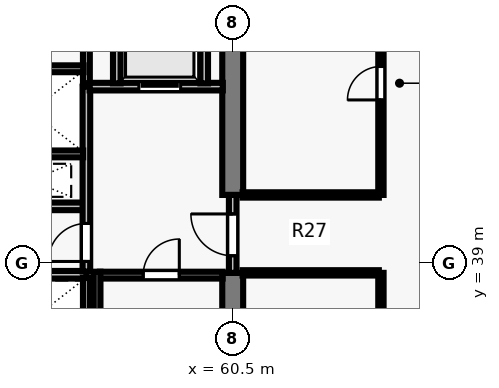
"""IFC4 building model, lengths in metres.
Left out: names, types, materials, properties, quantities, classifications, styles, units other than length and angle.
Written with IfcOpenShell. Run it as: python <this file> out.ifc"""

import sys

from ifc_helpers import new_model, si_unit, direction, frame, frame_2d, origin, place, context, subcontext, project, spatial, rectangle, extrude, element, fill, save


model = new_model("IFC4")
c1 = context("Model", 3, precision=1e-05, world=origin(), true_north=direction((0.0, 1.0)))
c2 = subcontext(c1, "Body", "Model", "MODEL_VIEW")
j1 = project(units=[si_unit("LENGTHUNIT", "METRE"), si_unit("PLANEANGLEUNIT", "RADIAN")], contexts=[c1])
p1 = place(None, origin())
s1 = spatial("IfcSite", under=j1, at=p1, CompositionType="ELEMENT")
p2 = place(p1, origin())
s2 = spatial("IfcBuilding", under=s1, at=p2, CompositionType="ELEMENT")
p3 = place(p2, frame((0.0, 0.0, 93.5)))
s3 = spatial("IfcBuildingStorey", under=s2, at=p3, CompositionType="ELEMENT", Elevation=93.5)
p4 = place(p3, frame((60.5, 30.765, 0.0), z_axis=(0.0, 0.0, 1.0), x_axis=(0.0, 1.0, 0.0)))
e1 = element("IfcWall", 1, at=p4, inside=s3, PredefinedType="SHEAR", context=c2, shape_type="SweptSolid", body=[
    extrude(rectangle(XDim=7.985, YDim=0.55, at=frame_2d((3.993, 0.0))), origin(), (0.0, 0.0, 1.0), 3.24),
])
p5 = place(p3, frame((60.5, 40.8, 0.0), z_axis=(0.0, 0.0, 1.0), x_axis=(0.0, 1.0, 0.0)))
e2 = element("IfcWall", 2, at=p5, inside=s3, PredefinedType="SHEAR", context=c2, shape_type="SweptSolid", body=[
    extrude(rectangle(XDim=6.435, YDim=0.55, at=frame_2d((3.218, 0.0))), origin(), (0.0, 0.0, 1.0), 3.24),
])
for number, where, z_axis, x_axis in (
    (3, (53.7, 38.7, 0.0), (0.0, 0.0, 1.0), (1.0, 0.0, 0.0)),
    (4, (53.7, 40.5, 0.0), (0.0, 0.0, 1.0), (1.0, 0.0, 0.0)),
):
    element("IfcWall", number, at=place(p3, frame(where, z_axis=z_axis, x_axis=x_axis)), inside=s3, PredefinedType="SOLIDWALL", context=c2, shape_type="SweptSolid", body=[
        extrude(rectangle(XDim=2.95, YDim=0.2, at=frame_2d((1.475, 0.0))), origin(), (0.0, 0.0, 1.0), 3.24),
    ])
p6 = place(p3, frame((60.5, 38.75, 0.0), z_axis=(0.0, 0.0, 1.0), x_axis=(0.0, 1.0, 0.0)))
e5 = element("IfcWall", 5, at=p6, inside=s3, PredefinedType="SOLIDWALL", context=c2, shape_type="SweptSolid", body=[
    extrude(rectangle(XDim=2.05, YDim=0.2, at=frame_2d((1.025, 0.0))), origin(), (0.0, 0.0, 1.0), 3.24),
])
p7 = place(p6, frame((0.45, 0.0, 0.0)))
e6 = element("IfcOpeningElement", 6, at=p7, cuts=e5, PredefinedType="OPENING", context=c2, shape_type="SweptSolid", body=[
    extrude(rectangle(XDim=1.1, YDim=2.15, at=frame_2d((0.55, 1.075))), frame((0.0, 0.11, 0.0), z_axis=(0.0, -1.0, 0.0), x_axis=(1.0, 0.0, 0.0)), (0.0, 0.0, 1.0), 0.22),
])
p8 = place(p3, frame((56.65, 38.785, 0.0), z_axis=(0.0, 0.0, 1.0), x_axis=(0.0, 1.0, 0.0)))
e7 = element("IfcWall", 7, at=p8, inside=s3, PredefinedType="SOLIDWALL", context=c2, shape_type="SweptSolid", body=[
    extrude(rectangle(XDim=4.865, YDim=0.2, at=frame_2d((2.433, 0.0))), origin(), (0.0, 0.0, 1.0), 3.24),
])
p9 = place(p8, frame((0.265, 0.0, 0.0)))
e8 = element("IfcOpeningElement", 8, at=p9, cuts=e7, PredefinedType="OPENING", context=c2, shape_type="SweptSolid", body=[
    extrude(rectangle(XDim=1.0, YDim=2.15, at=frame_2d((0.5, 1.075))), frame((0.0, 0.11, 0.0), z_axis=(0.0, -1.0, 0.0), x_axis=(1.0, 0.0, 0.0)), (0.0, 0.0, 1.0), 0.22),
])
p10 = place(p3, frame((56.735, 43.65, 0.0), z_axis=(0.0, 0.0, 1.0), x_axis=(1.0, 0.0, 0.0)))
e9 = element("IfcWall", 9, at=p10, inside=s3, PredefinedType="SOLIDWALL", context=c2, shape_type="SweptSolid", body=[
    extrude(rectangle(XDim=3.505, YDim=0.2, at=frame_2d((1.752, 0.0))), origin(), (0.0, 0.0, 1.0), 3.24),
])
p11 = place(p10, frame((1.295, 0.0, 0.0)))
e10 = element("IfcOpeningElement", 10, at=p11, cuts=e9, PredefinedType="OPENING", context=c2, shape_type="SweptSolid", body=[
    extrude(rectangle(XDim=1.1, YDim=2.2, at=frame_2d((0.55, 1.1))), frame((0.0, 0.11, 0.0), z_axis=(0.0, -1.0, 0.0), x_axis=(1.0, 0.0, 0.0)), (0.0, 0.0, 1.0), 0.22),
])
for number, where, z_axis, x_axis in (
    (11, (57.45, 43.735, 0.0), (0.0, 0.0, 1.0), (0.0, 1.0, 0.0)),
    (12, (59.75, 43.735, 0.0), (0.0, 0.0, 1.0), (0.0, 1.0, 0.0)),
):
    element("IfcWall", number, at=place(p3, frame(where, z_axis=z_axis, x_axis=x_axis)), inside=s3, PredefinedType="SOLIDWALL", context=c2, shape_type="SweptSolid", body=[
        extrude(rectangle(XDim=3.505, YDim=0.2, at=frame_2d((1.752, 0.0))), origin(), (0.0, 0.0, 1.0), 3.24),
    ])
p12 = place(p3, frame((56.65, 30.76, 0.0), z_axis=(0.0, 0.0, 1.0), x_axis=(0.0, 1.0, 0.0)))
e13 = element("IfcWall", 13, at=p12, inside=s3, PredefinedType="SOLIDWALL", context=c2, shape_type="SweptSolid", body=[
    extrude(rectangle(XDim=7.855, YDim=0.18, at=frame_2d((3.927, 0.0))), origin(), (0.0, 0.0, 1.0), 3.24),
])
p13 = place(p3, frame((56.65, 43.735, 0.0), z_axis=(0.0, 0.0, 1.0), x_axis=(0.0, 1.0, 0.0)))
e14 = element("IfcWall", 14, at=p13, inside=s3, PredefinedType="SOLIDWALL", context=c2, shape_type="SweptSolid", body=[
    extrude(rectangle(XDim=3.505, YDim=0.18, at=frame_2d((1.752, 0.0))), origin(), (0.0, 0.0, 1.0), 3.24),
])
p14 = place(p3, frame((53.785, 41.88, 0.0), z_axis=(0.0, 0.0, 1.0), x_axis=(1.0, 0.0, 0.0)))
e15 = element("IfcWall", 15, at=p14, inside=s3, PredefinedType="SOLIDWALL", context=c2, shape_type="SweptSolid", body=[
    extrude(rectangle(XDim=2.78, YDim=0.18, at=frame_2d((1.39, 0.0))), origin(), (0.0, 0.0, 1.0), 3.24),
])
p15 = place(p3, frame((53.785, 44.12, 0.0), z_axis=(0.0, 0.0, 1.0), x_axis=(1.0, 0.0, 0.0)))
e16 = element("IfcWall", 16, at=p15, inside=s3, PredefinedType="SOLIDWALL", context=c2, shape_type="SweptSolid", body=[
    extrude(rectangle(XDim=2.79, YDim=0.18, at=frame_2d((1.395, 0.0))), origin(), (0.0, 0.0, 1.0), 3.24),
])
p16 = place(p3, frame((64.4, 26.505, 0.0), z_axis=(0.0, 0.0, 1.0), x_axis=(0.0, 1.0, 0.0)))
e17 = element("IfcWall", 17, at=p16, inside=s3, PredefinedType="PARTITIONING", context=c2, shape_type="SweptSolid", body=[
    extrude(rectangle(XDim=12.245, YDim=0.14, at=frame_2d((6.123, 0.0))), origin(), (0.0, 0.0, 1.0), 3.24),
])
p17 = place(p16, frame((2.445, 0.0, 0.0)))
e18 = element("IfcOpeningElement", 18, at=p17, cuts=e17, PredefinedType="OPENING", context=c2, shape_type="SweptSolid", body=[
    extrude(rectangle(XDim=0.88, YDim=2.1, at=frame_2d((0.44, 1.05))), frame((0.0, 0.08, 0.0), z_axis=(0.0, -1.0, 0.0), x_axis=(1.0, 0.0, 0.0)), (0.0, 0.0, 1.0), 0.16),
])
p18 = place(p3, frame((64.4, 40.8, 0.0), z_axis=(0.0, 0.0, 1.0), x_axis=(0.0, 1.0, 0.0)))
e19 = element("IfcWall", 19, at=p18, inside=s3, PredefinedType="PARTITIONING", context=c2, shape_type="SweptSolid", body=[
    extrude(rectangle(XDim=10.695, YDim=0.14, at=frame_2d((5.348, 0.0))), origin(), (0.0, 0.0, 1.0), 3.24),
])
p19 = place(p18, frame((2.5, 0.0, 0.0)))
e20 = element("IfcOpeningElement", 20, at=p19, cuts=e19, PredefinedType="OPENING", context=c2, shape_type="SweptSolid", body=[
    extrude(rectangle(XDim=0.88, YDim=2.1, at=frame_2d((0.44, 1.05))), frame((0.0, 0.08, 0.0), z_axis=(0.0, -1.0, 0.0), x_axis=(1.0, 0.0, 0.0)), (0.0, 0.0, 1.0), 0.16),
])
for number, where, z_axis, x_axis in (
    (21, (60.76, 38.75, 0.0), (0.0, 0.0, 1.0), (1.0, 0.0, 0.0)),
    (22, (60.76, 40.8, 0.0), (0.0, 0.0, 1.0), (1.0, 0.0, 0.0)),
):
    element("IfcWall", number, at=place(p3, frame(where, z_axis=z_axis, x_axis=x_axis)), inside=s3, PredefinedType="PARTITIONING", context=c2, shape_type="SweptSolid", body=[
        extrude(rectangle(XDim=3.585, YDim=0.14, at=frame_2d((1.792, 0.0))), origin(), (0.0, 0.0, 1.0), 3.24),
    ])
p20 = place(p3, frame((57.005, 38.69, 0.0), z_axis=(0.0, 0.0, 1.0), x_axis=(1.0, 0.0, 0.0)))
e23 = element("IfcWall", 23, at=p20, inside=s3, PredefinedType="SOLIDWALL", context=c2, shape_type="SweptSolid", body=[
    extrude(rectangle(XDim=3.23, YDim=0.18, at=frame_2d((1.615, 0.0))), origin(), (0.0, 0.0, 1.0), 3.24),
])
p21 = place(p20, frame((1.14, 0.0, 0.0)))
e24 = element("IfcOpeningElement", 24, at=p21, cuts=e23, PredefinedType="OPENING", context=c2, shape_type="SweptSolid", body=[
    extrude(rectangle(XDim=0.95, YDim=2.15, at=frame_2d((0.475, 1.075))), frame((0.0, 0.1, 0.0), z_axis=(0.0, -1.0, 0.0), x_axis=(1.0, 0.0, 0.0)), (0.0, 0.0, 1.0), 0.2),
])
p22 = place(p3, frame((56.93, 38.78, 0.0), z_axis=(0.0, 0.0, 1.0), x_axis=(0.0, -1.0, 0.0)))
e25 = element("IfcWall", 25, at=p22, inside=s3, PredefinedType="SOLIDWALL", context=c2, shape_type="SweptSolid", body=[
    extrude(rectangle(XDim=8.017, YDim=0.18, at=frame_2d((4.009, 0.0))), origin(), (0.0, 0.0, 1.0), 3.24),
])
p23 = place(p7, origin())
e26 = element("IfcDoor", 26, at=p23, inside=s3, OperationType="SINGLE_SWING_RIGHT", PredefinedType="DOOR", context=c2, shape_type="SweptSolid", body=[
    extrude(rectangle(XDim=1.1, YDim=2.15, at=frame_2d((0.55, 1.075))), frame((0.0, 0.025, 0.0), z_axis=(0.0, -1.0, 0.0), x_axis=(1.0, 0.0, 0.0)), (0.0, 0.0, 1.0), 0.05),
])
fill(e6, e26)
p24 = place(p9, origin())
e27 = element("IfcDoor", 27, at=p24, inside=s3, OperationType="SINGLE_SWING_LEFT", PredefinedType="DOOR", context=c2, shape_type="SweptSolid", body=[
    extrude(rectangle(XDim=1.0, YDim=2.15, at=frame_2d((0.5, 1.075))), frame((0.0, 0.025, 0.0), z_axis=(0.0, -1.0, 0.0), x_axis=(1.0, 0.0, 0.0)), (0.0, 0.0, 1.0), 0.05),
])
fill(e8, e27)
p25 = place(p11, origin())
e28 = element("IfcDoor", 28, at=p25, inside=s3, OperationType="SLIDING_TO_LEFT", PredefinedType="DOOR", context=c2, shape_type="SweptSolid", body=[
    extrude(rectangle(XDim=1.1, YDim=2.2, at=frame_2d((0.55, 1.1))), frame((0.0, 0.025, 0.0), z_axis=(0.0, -1.0, 0.0), x_axis=(1.0, 0.0, 0.0)), (0.0, 0.0, 1.0), 0.05),
])
fill(e10, e28)
p26 = place(p19, origin())
e29 = element("IfcDoor", 29, at=p26, inside=s3, OperationType="SINGLE_SWING_LEFT", PredefinedType="DOOR", context=c2, shape_type="SweptSolid", body=[
    extrude(rectangle(XDim=0.88, YDim=2.1, at=frame_2d((0.44, 1.05))), frame((0.0, 0.025, 0.0), z_axis=(0.0, -1.0, 0.0), x_axis=(1.0, 0.0, 0.0)), (0.0, 0.0, 1.0), 0.05),
])
fill(e20, e29)
p27 = place(p21, origin())
e30 = element("IfcDoor", 30, at=p27, inside=s3, OperationType="SINGLE_SWING_RIGHT", PredefinedType="DOOR", context=c2, shape_type="SweptSolid", body=[
    extrude(rectangle(XDim=0.95, YDim=2.15, at=frame_2d((0.475, 1.075))), frame((0.0, 0.025, 0.0), z_axis=(0.0, -1.0, 0.0), x_axis=(1.0, 0.0, 0.0)), (0.0, 0.0, 1.0), 0.05),
])
fill(e24, e30)
save(model, sys.argv[1])
